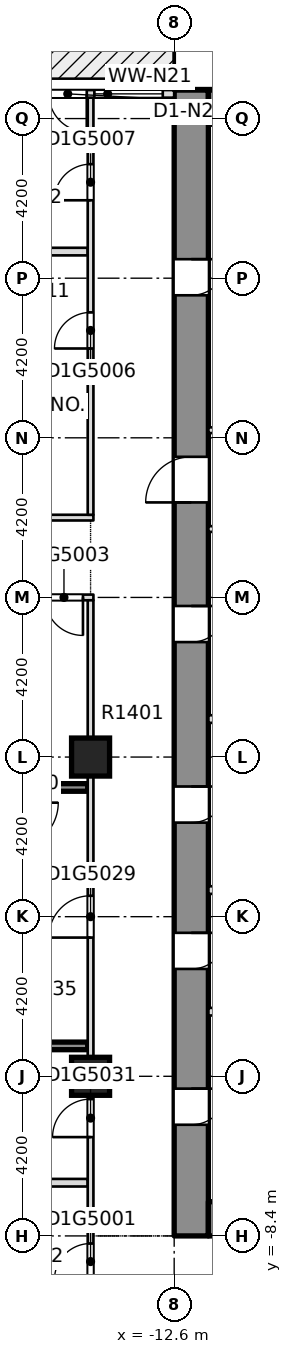
"""IFC4 building model, lengths in metres.
Left out: names, types, materials, properties, quantities, classifications, styles, units other than length and angle.
Written with IfcOpenShell. Run it as: python <this file> out.ifc"""

import sys

from ifc_helpers import new_model, si_unit, direction, frame, frame_2d, origin, origin_2d, place, context, subcontext, project, spatial, rectangle, extrude, element, fill, save


model = new_model("IFC4")
c1 = context("Model", 3, precision=1e-05, world=origin(), true_north=direction((0.0, 1.0)))
c2 = subcontext(c1, "Body", "Model", "MODEL_VIEW")
j1 = project(units=[si_unit("LENGTHUNIT", "METRE"), si_unit("PLANEANGLEUNIT", "RADIAN")], contexts=[c1])
p1 = place(None, origin())
s1 = spatial("IfcSite", under=j1, at=p1, CompositionType="ELEMENT")
p2 = place(p1, origin())
s2 = spatial("IfcBuilding", under=s1, at=p2, CompositionType="ELEMENT")
p3 = place(p2, frame((0.0, 0.0, 62.1)))
s3 = spatial("IfcBuildingStorey", under=s2, at=p3, CompositionType="ELEMENT", Elevation=62.1)
p4 = place(p3, frame((-12.15, -8.4, -0.32), z_axis=(0.0, 0.0, 1.0), x_axis=(0.0, 1.0, 0.0)))
e1 = element("IfcWall", 1, at=p4, inside=s3, PredefinedType="SHEAR", context=c2, shape_type="SweptSolid", body=[
    extrude(rectangle(XDim=30.15, YDim=0.9, at=frame_2d((15.075, 0.0))), origin(), (0.0, 0.0, 1.0), 3.45),
])
p5 = place(p4, frame((2.925, 0.0, 0.32)))
e2 = element("IfcOpeningElement", 2, at=p5, cuts=e1, PredefinedType="OPENING", context=c2, shape_type="SweptSolid", body=[
    extrude(rectangle(XDim=0.95, YDim=2.1, at=frame_2d((0.475, 1.05))), frame((0.0, 0.46, 0.0), z_axis=(0.0, -1.0, 0.0), x_axis=(1.0, 0.0, 0.0)), (0.0, 0.0, 1.0), 0.92),
])
p6 = place(p4, frame((7.025, 0.0, 0.32)))
e3 = element("IfcOpeningElement", 3, at=p6, cuts=e1, PredefinedType="OPENING", context=c2, shape_type="SweptSolid", body=[
    extrude(rectangle(XDim=0.95, YDim=2.1, at=frame_2d((0.475, 1.05))), frame((0.0, 0.46, 0.0), z_axis=(0.0, -1.0, 0.0), x_axis=(1.0, 0.0, 0.0)), (0.0, 0.0, 1.0), 0.92),
])
p7 = place(p4, frame((10.875, 0.0, 0.32)))
e4 = element("IfcOpeningElement", 4, at=p7, cuts=e1, PredefinedType="OPENING", context=c2, shape_type="SweptSolid", body=[
    extrude(rectangle(XDim=0.95, YDim=2.1, at=frame_2d((0.475, 1.05))), frame((0.0, 0.46, 0.0), z_axis=(0.0, -1.0, 0.0), x_axis=(1.0, 0.0, 0.0)), (0.0, 0.0, 1.0), 0.92),
])
p8 = place(p4, frame((15.625, 0.0, 0.32)))
e5 = element("IfcOpeningElement", 5, at=p8, cuts=e1, PredefinedType="OPENING", context=c2, shape_type="SweptSolid", body=[
    extrude(rectangle(XDim=0.95, YDim=2.1, at=frame_2d((0.475, 1.05))), frame((0.0, 0.46, 0.0), z_axis=(0.0, -1.0, 0.0), x_axis=(1.0, 0.0, 0.0)), (0.0, 0.0, 1.0), 0.92),
])
p9 = place(p4, frame((24.75, 0.0, 0.32)))
e6 = element("IfcOpeningElement", 6, at=p9, cuts=e1, PredefinedType="OPENING", context=c2, shape_type="SweptSolid", body=[
    extrude(rectangle(XDim=0.95, YDim=2.1, at=frame_2d((0.475, 1.05))), frame((0.0, 0.46, 0.0), z_axis=(0.0, -1.0, 0.0), x_axis=(1.0, 0.0, 0.0)), (0.0, 0.0, 1.0), 0.92),
])
p10 = place(p4, frame((19.3, 0.0, 0.32)))
e7 = element("IfcOpeningElement", 7, at=p10, cuts=e1, PredefinedType="OPENING", context=c2, shape_type="SweptSolid", body=[
    extrude(rectangle(XDim=1.2, YDim=2.1, at=frame_2d((0.6, 1.05))), frame((0.0, 0.46, 0.0), z_axis=(0.0, -1.0, 0.0), x_axis=(1.0, 0.0, 0.0)), (0.0, 0.0, 1.0), 0.92),
])
p11 = place(p3, frame((-11.7, -7.95, -0.32), z_axis=(0.0, 0.0, 1.0), x_axis=(1.0, 0.0, 0.0)))
e8 = element("IfcWall", 8, at=p11, inside=s3, PredefinedType="SHEAR", context=c2, shape_type="SweptSolid", body=[
    extrude(rectangle(XDim=23.4, YDim=0.9, at=frame_2d((11.7, 0.0))), origin(), (0.0, 0.0, 1.0), 3.45),
])
p12 = place(p11, frame((6.95, 0.0, 0.32)))
e9 = element("IfcOpeningElement", 9, at=p12, cuts=e8, PredefinedType="OPENING", context=c2, shape_type="SweptSolid", body=[
    extrude(rectangle(XDim=1.8, YDim=2.1, at=frame_2d((0.9, 1.05))), frame((0.0, 0.46, 0.0), z_axis=(0.0, -1.0, 0.0), x_axis=(1.0, 0.0, 0.0)), (0.0, 0.0, 1.0), 0.92),
])
p13 = place(p11, frame((14.65, 0.0, 0.32)))
e10 = element("IfcOpeningElement", 10, at=p13, cuts=e8, PredefinedType="OPENING", context=c2, shape_type="SweptSolid", body=[
    extrude(rectangle(XDim=1.8, YDim=2.1, at=frame_2d((0.9, 1.05))), frame((0.0, 0.46, 0.0), z_axis=(0.0, -1.0, 0.0), x_axis=(1.0, 0.0, 0.0)), (0.0, 0.0, 1.0), 0.92),
])
p14 = place(p3, frame((-11.7, 21.3, -0.32), z_axis=(0.0, 0.0, 1.0), x_axis=(1.0, 0.0, 0.0)))
e11 = element("IfcWall", 11, at=p14, inside=s3, PredefinedType="SOLIDWALL", context=c2, shape_type="SweptSolid", body=[
    extrude(rectangle(XDim=23.4, YDim=0.9, at=frame_2d((11.7, 0.0))), origin(), (0.0, 0.0, 1.0), 3.45),
])
for number, where, z_axis, x_axis in (
    (12, (-14.8, -4.2, -0.32), (0.0, 0.0, 1.0), (1.0, 0.0, 0.0)),
    (13, (-14.8, 4.2, -0.32), (0.0, 0.0, 1.0), (1.0, 0.0, 0.0)),
):
    element("IfcColumn", number, at=place(p3, frame(where, z_axis=z_axis, x_axis=x_axis)), inside=s3, PredefinedType="COLUMN", context=c2, shape_type="SweptSolid", body=[
        extrude(rectangle(XDim=1.0, YDim=1.0, at=origin_2d()), origin(), (0.0, 0.0, 1.0), 3.45),
    ])
p15 = place(p3, frame((-25.75, -7.0, 0.0), z_axis=(0.0, 0.0, 1.0), x_axis=(1.0, 0.0, 0.0)))
e14 = element("IfcWall", 14, at=p15, inside=s3, PredefinedType="PARTITIONING", context=c2, shape_type="SweptSolid", body=[
    extrude(rectangle(XDim=10.875, YDim=0.2, at=frame_2d((5.438, 0.0))), origin(), (0.0, 0.0, 1.0), 3.13),
])
p16 = place(p3, frame((-20.4, -3.4, 0.0), z_axis=(0.0, 0.0, 1.0), x_axis=(1.0, 0.0, 0.0)))
e15 = element("IfcWall", 15, at=p16, inside=s3, PredefinedType="SOLIDWALL", context=c2, shape_type="SweptSolid", body=[
    extrude(rectangle(XDim=5.525, YDim=0.2, at=frame_2d((2.762, 0.0))), origin(), (0.0, 0.0, 1.0), 3.13),
])
p17 = place(p3, frame((-20.45, 3.4, 0.0), z_axis=(0.0, 0.0, 1.0), x_axis=(1.0, 0.0, 0.0)))
e16 = element("IfcWall", 16, at=p17, inside=s3, PredefinedType="SOLIDWALL", context=c2, shape_type="SweptSolid", body=[
    extrude(rectangle(XDim=5.575, YDim=0.2, at=frame_2d((2.788, 0.0))), origin(), (0.0, 0.0, 1.0), 3.13),
])
p18 = place(p3, frame((-25.75, 8.4, 0.0), z_axis=(0.0, 0.0, 1.0), x_axis=(1.0, 0.0, 0.0)))
e17 = element("IfcWall", 17, at=p18, inside=s3, PredefinedType="PARTITIONING", context=c2, shape_type="SweptSolid", body=[
    extrude(rectangle(XDim=11.025, YDim=0.15, at=frame_2d((5.512, 0.0))), origin(), (0.0, 0.0, 1.0), 3.13),
])
p19 = place(p18, frame((9.75, 0.0, 0.0)))
e18 = element("IfcOpeningElement", 18, at=p19, cuts=e17, PredefinedType="OPENING", context=c2, shape_type="SweptSolid", body=[
    extrude(rectangle(XDim=1.0, YDim=2.1, at=frame_2d((0.5, 1.05))), frame((0.0, 0.085, 0.0), z_axis=(0.0, -1.0, 0.0), x_axis=(1.0, 0.0, 0.0)), (0.0, 0.0, 1.0), 0.17),
])
p20 = place(p3, frame((-25.75, 10.5, 0.0), z_axis=(0.0, 0.0, 1.0), x_axis=(1.0, 0.0, 0.0)))
e19 = element("IfcWall", 19, at=p20, inside=s3, PredefinedType="PARTITIONING", context=c2, shape_type="SweptSolid", body=[
    extrude(rectangle(XDim=11.025, YDim=0.15, at=frame_2d((5.512, 0.0))), origin(), (0.0, 0.0, 1.0), 3.13),
])
p21 = place(p20, frame((4.875, 0.0, 0.0)))
e20 = element("IfcOpeningElement", 20, at=p21, cuts=e19, PredefinedType="OPENING", context=c2, shape_type="SweptSolid", body=[
    extrude(rectangle(XDim=1.0, YDim=2.1, at=frame_2d((0.5, 1.05))), frame((0.0, 0.085, 0.0), z_axis=(0.0, -1.0, 0.0), x_axis=(1.0, 0.0, 0.0)), (0.0, 0.0, 1.0), 0.17),
])
for number, where, z_axis, x_axis in (
    (21, (-17.35, 13.35, 0.0), (0.0, 0.0, 1.0), (1.0, 0.0, 0.0)),
    (22, (-17.35, 17.5, 0.0), (0.0, 0.0, 1.0), (1.0, 0.0, 0.0)),
):
    element("IfcWall", number, at=place(p3, frame(where, z_axis=z_axis, x_axis=x_axis)), inside=s3, PredefinedType="PARTITIONING", context=c2, shape_type="SweptSolid", body=[
        extrude(rectangle(XDim=2.475, YDim=0.2, at=frame_2d((1.238, 0.0))), origin(), (0.0, 0.0, 1.0), 3.13),
    ])
p22 = place(p3, frame((-14.8, -9.85, 0.0), z_axis=(0.0, 0.0, 1.0), x_axis=(0.0, 1.0, 0.0)))
e23 = element("IfcWall", 23, at=p22, inside=s3, PredefinedType="PARTITIONING", context=c2, shape_type="SweptSolid", body=[
    extrude(rectangle(XDim=18.175, YDim=0.15, at=frame_2d((9.087, 0.0))), origin(), (0.0, 0.0, 1.0), 3.13),
])
p23 = place(p22, frame((0.3, 0.0, 0.0)))
e24 = element("IfcOpeningElement", 24, at=p23, cuts=e23, PredefinedType="OPENING", context=c2, shape_type="SweptSolid", body=[
    extrude(rectangle(XDim=0.95, YDim=2.1, at=frame_2d((0.475, 1.05))), frame((0.0, 0.085, 0.0), z_axis=(0.0, -1.0, 0.0), x_axis=(1.0, 0.0, 0.0)), (0.0, 0.0, 1.0), 0.17),
])
p24 = place(p22, frame((9.3, 0.0, 0.0)))
e25 = element("IfcOpeningElement", 25, at=p24, cuts=e23, PredefinedType="OPENING", context=c2, shape_type="SweptSolid", body=[
    extrude(rectangle(XDim=1.1, YDim=2.1, at=frame_2d((0.55, 1.05))), frame((0.0, 0.085, 0.0), z_axis=(0.0, -1.0, 0.0), x_axis=(1.0, 0.0, 0.0)), (0.0, 0.0, 1.0), 0.17),
])
p25 = place(p22, frame((4.05, 0.0, 0.0)))
e26 = element("IfcOpeningElement", 26, at=p25, cuts=e23, PredefinedType="OPENING", context=c2, shape_type="SweptSolid", body=[
    extrude(rectangle(XDim=1.0, YDim=2.1, at=frame_2d((0.5, 1.05))), frame((0.0, 0.085, 0.0), z_axis=(0.0, -1.0, 0.0), x_axis=(1.0, 0.0, 0.0)), (0.0, 0.0, 1.0), 0.17),
])
p26 = place(p3, frame((-14.8, 10.575, 0.0), z_axis=(0.0, 0.0, 1.0), x_axis=(0.0, 1.0, 0.0)))
e27 = element("IfcWall", 27, at=p26, inside=s3, PredefinedType="PARTITIONING", context=c2, shape_type="SweptSolid", body=[
    extrude(rectangle(XDim=10.975, YDim=0.15, at=frame_2d((5.488, 0.0))), origin(), (0.0, 0.0, 1.0), 3.13),
])
p27 = place(p26, frame((4.375, 0.0, 0.0)))
e28 = element("IfcOpeningElement", 28, at=p27, cuts=e27, PredefinedType="OPENING", context=c2, shape_type="SweptSolid", body=[
    extrude(rectangle(XDim=0.95, YDim=2.1, at=frame_2d((0.475, 1.05))), frame((0.0, 0.085, 0.0), z_axis=(0.0, -1.0, 0.0), x_axis=(1.0, 0.0, 0.0)), (0.0, 0.0, 1.0), 0.17),
])
p28 = place(p26, frame((8.275, 0.0, 0.0)))
e29 = element("IfcOpeningElement", 29, at=p28, cuts=e27, PredefinedType="OPENING", context=c2, shape_type="SweptSolid", body=[
    extrude(rectangle(XDim=0.95, YDim=2.1, at=frame_2d((0.475, 1.05))), frame((0.0, 0.085, 0.0), z_axis=(0.0, -1.0, 0.0), x_axis=(1.0, 0.0, 0.0)), (0.0, 0.0, 1.0), 0.17),
])
p29 = place(p3, frame((-12.6, 21.65, 0.0), z_axis=(0.0, 0.0, 1.0), x_axis=(-1.0, 0.0, 0.0)))
e30 = element("IfcWall", 30, at=p29, inside=s3, PredefinedType="STANDARD", context=c2, shape_type="SweptSolid", body=[
    extrude(rectangle(XDim=3.5, YDim=0.2, at=frame_2d((1.75, 0.0))), origin(), (0.0, 0.0, 1.0), 3.13),
])
p30 = place(p29, frame((0.3, 0.0, 0.2)))
e31 = element("IfcOpeningElement", 31, at=p30, cuts=e30, PredefinedType="OPENING", context=c2, shape_type="SweptSolid", body=[
    extrude(rectangle(XDim=1.8, YDim=2.65, at=frame_2d((0.9, 1.325))), frame((0.0, 0.11, 0.0), z_axis=(0.0, -1.0, 0.0), x_axis=(1.0, 0.0, 0.0)), (0.0, 0.0, 1.0), 0.22),
])
p31 = place(p29, frame((2.3, 0.0, 0.0)))
e32 = element("IfcOpeningElement", 32, at=p31, cuts=e30, PredefinedType="OPENING", context=c2, shape_type="SweptSolid", body=[
    extrude(rectangle(XDim=1.0, YDim=2.4, at=frame_2d((0.5, 1.2))), frame((0.0, 0.11, 0.0), z_axis=(0.0, -1.0, 0.0), x_axis=(1.0, 0.0, 0.0)), (0.0, 0.0, 1.0), 0.22),
])
for number, where, z_axis, x_axis in (
    (33, (-11.699, -2.5, 0.0), (0.0, 0.0, 1.0), (1.0, 0.0, 0.0)),
    (34, (-11.699, 0.7, 0.0), (0.0, 0.0, 1.0), (1.0, 0.0, 0.0)),
    (35, (-11.699, 5.2, 0.0), (0.0, 0.0, 1.0), (1.0, 0.0, 0.0)),
):
    element("IfcWall", number, at=place(p3, frame(where, z_axis=z_axis, x_axis=x_axis)), inside=s3, PredefinedType="PARTITIONING", context=c2, shape_type="SweptSolid", body=[
        extrude(rectangle(XDim=2.848, YDim=0.2, at=frame_2d((1.424, 0.0))), origin(), (0.0, 0.0, 1.0), 3.13),
    ])
for number, where, z_axis, x_axis in (
    (36, (-11.699, 10.2, 0.0), (0.0, 0.0, 1.0), (1.0, 0.0, 0.0)),
    (37, (-11.699, 12.8, 0.0), (0.0, 0.0, 1.0), (1.0, 0.0, 0.0)),
):
    element("IfcWall", number, at=place(p3, frame(where, z_axis=z_axis, x_axis=x_axis)), inside=s3, PredefinedType="PARTITIONING", context=c2, shape_type="SweptSolid", body=[
        extrude(rectangle(XDim=2.848, YDim=0.15, at=frame_2d((1.424, 0.0))), origin(), (0.0, 0.0, 1.0), 3.13),
    ])
p32 = place(p23, origin())
e38 = element("IfcDoor", 38, at=p32, inside=s3, OperationType="SINGLE_SWING_LEFT", PredefinedType="DOOR", context=c2, shape_type="SweptSolid", body=[
    extrude(rectangle(XDim=0.95, YDim=2.1, at=frame_2d((0.475, 1.05))), frame((0.0, 0.025, 0.0), z_axis=(0.0, -1.0, 0.0), x_axis=(1.0, 0.0, 0.0)), (0.0, 0.0, 1.0), 0.05),
])
fill(e24, e38)
p33 = place(p19, origin())
e39 = element("IfcDoor", 39, at=p33, inside=s3, OperationType="SINGLE_SWING_RIGHT", PredefinedType="DOOR", context=c2, shape_type="SweptSolid", body=[
    extrude(rectangle(XDim=1.0, YDim=2.1, at=frame_2d((0.5, 1.05))), frame((0.0, 0.025, 0.0), z_axis=(0.0, -1.0, 0.0), x_axis=(1.0, 0.0, 0.0)), (0.0, 0.0, 1.0), 0.05),
])
fill(e18, e39)
p34 = place(p27, origin())
e40 = element("IfcDoor", 40, at=p34, inside=s3, OperationType="SINGLE_SWING_LEFT", PredefinedType="DOOR", context=c2, shape_type="SweptSolid", body=[
    extrude(rectangle(XDim=0.95, YDim=2.1, at=frame_2d((0.475, 1.05))), frame((0.0, 0.025, 0.0), z_axis=(0.0, -1.0, 0.0), x_axis=(1.0, 0.0, 0.0)), (0.0, 0.0, 1.0), 0.05),
])
fill(e28, e40)
p35 = place(p28, origin())
e41 = element("IfcDoor", 41, at=p35, inside=s3, OperationType="SINGLE_SWING_RIGHT", PredefinedType="DOOR", context=c2, shape_type="SweptSolid", body=[
    extrude(rectangle(XDim=0.95, YDim=2.1, at=frame_2d((0.475, 1.05))), frame((0.0, 0.025, 0.0), z_axis=(0.0, -1.0, 0.0), x_axis=(1.0, 0.0, 0.0)), (0.0, 0.0, 1.0), 0.05),
])
fill(e29, e41)
p36 = place(p24, origin())
e42 = element("IfcDoor", 42, at=p36, inside=s3, OperationType="SINGLE_SWING_RIGHT", PredefinedType="DOOR", context=c2, shape_type="SweptSolid", body=[
    extrude(rectangle(XDim=1.1, YDim=2.1, at=frame_2d((0.55, 1.05))), frame((0.0, 0.025, 0.0), z_axis=(0.0, -1.0, 0.0), x_axis=(1.0, 0.0, 0.0)), (0.0, 0.0, 1.0), 0.05),
])
fill(e25, e42)
p37 = place(p25, origin())
e43 = element("IfcDoor", 43, at=p37, inside=s3, OperationType="SINGLE_SWING_LEFT", PredefinedType="DOOR", context=c2, shape_type="SweptSolid", body=[
    extrude(rectangle(XDim=1.0, YDim=2.1, at=frame_2d((0.5, 1.05))), frame((0.0, 0.025, 0.0), z_axis=(0.0, -1.0, 0.0), x_axis=(1.0, 0.0, 0.0)), (0.0, 0.0, 1.0), 0.05),
])
fill(e26, e43)
p38 = place(p30, origin())
e44 = element("IfcWindow", 44, at=p38, inside=s3, PartitioningType="SINGLE_PANEL", PredefinedType="WINDOW", context=c2, shape_type="SweptSolid", body=[
    extrude(rectangle(XDim=1.8, YDim=2.65, at=frame_2d((0.9, 1.325))), frame((0.0, 0.03, 0.0), z_axis=(0.0, -1.0, 0.0), x_axis=(1.0, 0.0, 0.0)), (0.0, 0.0, 1.0), 0.06),
])
fill(e31, e44)
p39 = place(p31, origin())
e45 = element("IfcDoor", 45, at=p39, inside=s3, OperationType="SINGLE_SWING_LEFT", PredefinedType="DOOR", context=c2, shape_type="SweptSolid", body=[
    extrude(rectangle(XDim=1.0, YDim=2.4, at=frame_2d((0.5, 1.2))), frame((0.0, 0.025, 0.0), z_axis=(0.0, -1.0, 0.0), x_axis=(1.0, 0.0, 0.0)), (0.0, 0.0, 1.0), 0.05),
])
fill(e32, e45)
p40 = place(p5, origin())
e46 = element("IfcDoor", 46, at=p40, inside=s3, OperationType="SINGLE_SWING_LEFT", PredefinedType="DOOR", context=c2, shape_type="SweptSolid", body=[
    extrude(rectangle(XDim=0.95, YDim=2.1, at=frame_2d((0.475, 1.05))), frame((0.0, 0.025, 0.0), z_axis=(0.0, -1.0, 0.0), x_axis=(1.0, 0.0, 0.0)), (0.0, 0.0, 1.0), 0.05),
])
fill(e2, e46)
p41 = place(p6, origin())
e47 = element("IfcDoor", 47, at=p41, inside=s3, OperationType="SINGLE_SWING_LEFT", PredefinedType="DOOR", context=c2, shape_type="SweptSolid", body=[
    extrude(rectangle(XDim=0.95, YDim=2.1, at=frame_2d((0.475, 1.05))), frame((0.0, 0.025, 0.0), z_axis=(0.0, -1.0, 0.0), x_axis=(1.0, 0.0, 0.0)), (0.0, 0.0, 1.0), 0.05),
])
fill(e3, e47)
p42 = place(p7, origin())
e48 = element("IfcDoor", 48, at=p42, inside=s3, OperationType="SINGLE_SWING_LEFT", PredefinedType="DOOR", context=c2, shape_type="SweptSolid", body=[
    extrude(rectangle(XDim=0.95, YDim=2.1, at=frame_2d((0.475, 1.05))), frame((0.0, 0.025, 0.0), z_axis=(0.0, -1.0, 0.0), x_axis=(1.0, 0.0, 0.0)), (0.0, 0.0, 1.0), 0.05),
])
fill(e4, e48)
p43 = place(p8, origin())
e49 = element("IfcDoor", 49, at=p43, inside=s3, OperationType="SINGLE_SWING_LEFT", PredefinedType="DOOR", context=c2, shape_type="SweptSolid", body=[
    extrude(rectangle(XDim=0.95, YDim=2.1, at=frame_2d((0.475, 1.05))), frame((0.0, 0.025, 0.0), z_axis=(0.0, -1.0, 0.0), x_axis=(1.0, 0.0, 0.0)), (0.0, 0.0, 1.0), 0.05),
])
fill(e5, e49)
p44 = place(p9, origin())
e50 = element("IfcDoor", 50, at=p44, inside=s3, OperationType="SINGLE_SWING_LEFT", PredefinedType="DOOR", context=c2, shape_type="SweptSolid", body=[
    extrude(rectangle(XDim=0.95, YDim=2.1, at=frame_2d((0.475, 1.05))), frame((0.0, 0.025, 0.0), z_axis=(0.0, -1.0, 0.0), x_axis=(1.0, 0.0, 0.0)), (0.0, 0.0, 1.0), 0.05),
])
fill(e6, e50)
p45 = place(p10, origin())
e51 = element("IfcDoor", 51, at=p45, inside=s3, OperationType="SINGLE_SWING_LEFT", PredefinedType="DOOR", context=c2, shape_type="SweptSolid", body=[
    extrude(rectangle(XDim=1.2, YDim=2.1, at=frame_2d((0.6, 1.05))), frame((0.0, 0.025, 0.0), z_axis=(0.0, -1.0, 0.0), x_axis=(1.0, 0.0, 0.0)), (0.0, 0.0, 1.0), 0.05),
])
fill(e7, e51)
save(model, sys.argv[1])
